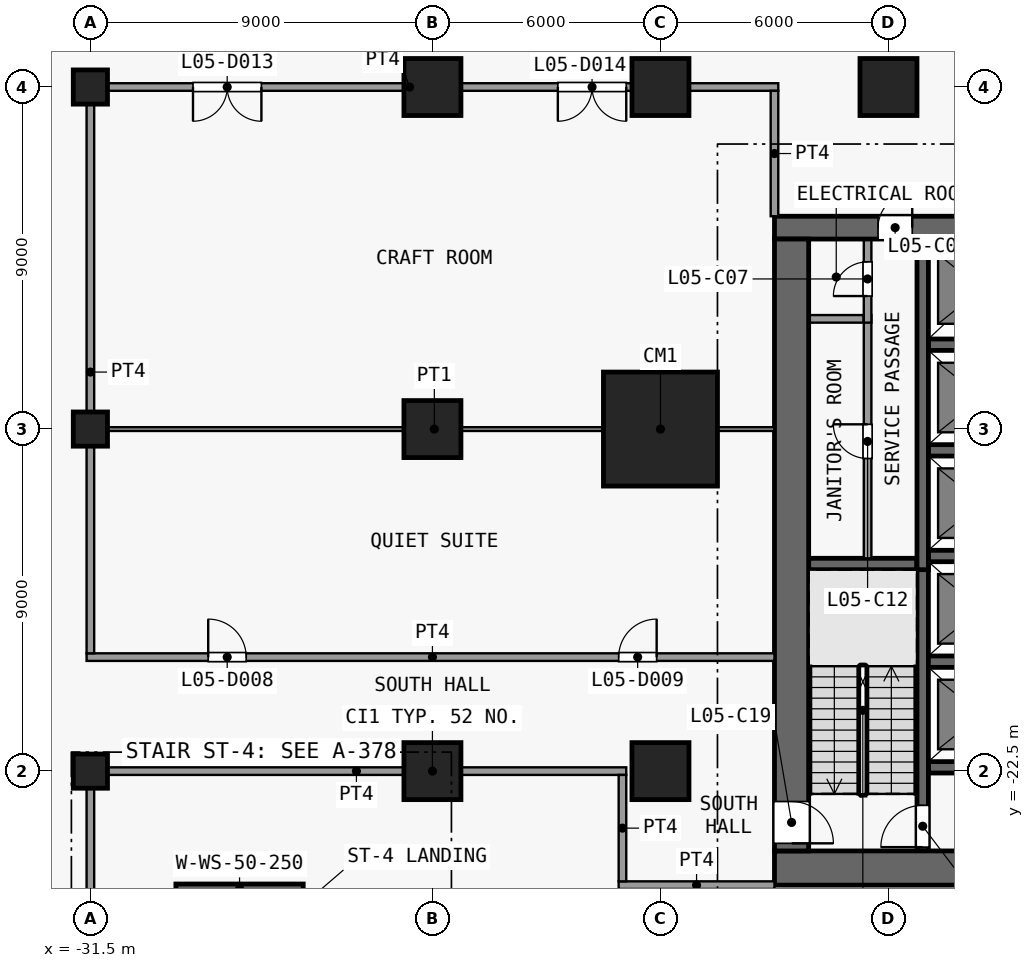
"""IFC4 building model, lengths in metres.
Left out: names, types, materials, properties, quantities, classifications, styles, units other than length and angle.
Written with IfcOpenShell. Run it as: python <this file> out.ifc"""

import sys

from ifc_helpers import new_model, si_unit, direction, frame, frame_2d, origin, origin_2d, place, context, subcontext, project, spatial, rectangle, extrude, element, fill, save


model = new_model("IFC4")
c1 = context("Model", 3, precision=1e-05, world=origin(), true_north=direction((0.0, 1.0)))
c2 = subcontext(c1, "Body", "Model", "MODEL_VIEW")
j1 = project(units=[si_unit("LENGTHUNIT", "METRE"), si_unit("PLANEANGLEUNIT", "RADIAN")], contexts=[c1])
p1 = place(None, origin())
s1 = spatial("IfcSite", under=j1, at=p1, CompositionType="ELEMENT")
p2 = place(p1, origin())
s2 = spatial("IfcBuilding", under=s1, at=p2, CompositionType="ELEMENT")
p3 = place(p2, frame((0.0, 0.0, 28.0)))
s3 = spatial("IfcBuildingStorey", under=s2, at=p3, CompositionType="ELEMENT", Elevation=28.0)
for number, where, z_axis, x_axis in (
    (1, (-31.5, -22.5, 0.0), (0.0, 0.0, 1.0), (1.0, 0.0, 0.0)),
    (2, (-31.5, -13.5, 0.0), (0.0, 0.0, 1.0), (1.0, 0.0, 0.0)),
    (3, (-31.5, -4.5, 0.0), (0.0, 0.0, 1.0), (1.0, 0.0, 0.0)),
):
    element("IfcColumn", number, at=place(p3, frame(where, z_axis=z_axis, x_axis=x_axis)), inside=s3, PredefinedType="COLUMN", context=c2, shape_type="SweptSolid", body=[
        extrude(rectangle(XDim=0.9, YDim=0.9, at=origin_2d()), origin(), (0.0, 0.0, 1.0), 4.5),
    ])
for number, where, z_axis, x_axis in (
    (4, (-22.5, -22.5, 0.0), (0.0, 0.0, 1.0), (1.0, 0.0, 0.0)),
    (5, (-22.5, -13.5, 0.0), (0.0, 0.0, 1.0), (1.0, 0.0, 0.0)),
    (6, (-22.5, -4.5, 0.0), (0.0, 0.0, 1.0), (1.0, 0.0, 0.0)),
    (7, (-16.5, -22.5, 0.0), (0.0, 0.0, 1.0), (1.0, 0.0, 0.0)),
):
    element("IfcColumn", number, at=place(p3, frame(where, z_axis=z_axis, x_axis=x_axis)), inside=s3, PredefinedType="COLUMN", context=c2, shape_type="SweptSolid", body=[
        extrude(rectangle(XDim=1.5, YDim=1.5, at=origin_2d()), origin(), (0.0, 0.0, 1.0), 4.5),
    ])
p4 = place(p3, frame((-16.5, -13.5, 0.0), z_axis=(0.0, 0.0, 1.0), x_axis=(1.0, 0.0, 0.0)))
e8 = element("IfcColumn", 8, at=p4, inside=s3, PredefinedType="COLUMN", context=c2, shape_type="SweptSolid", body=[
    extrude(rectangle(XDim=3.0, YDim=3.0, at=origin_2d()), origin(), (0.0, 0.0, 1.0), 4.5),
])
for number, where, z_axis, x_axis in (
    (9, (-16.5, -4.5, 0.0), (0.0, 0.0, 1.0), (1.0, 0.0, 0.0)),
    (10, (-10.5, -4.5, 0.0), (0.0, 0.0, 1.0), (1.0, 0.0, 0.0)),
):
    element("IfcColumn", number, at=place(p3, frame(where, z_axis=z_axis, x_axis=x_axis)), inside=s3, PredefinedType="COLUMN", context=c2, shape_type="SweptSolid", body=[
        extrude(rectangle(XDim=1.5, YDim=1.5, at=origin_2d()), origin(), (0.0, 0.0, 1.0), 4.5),
    ])
p5 = place(p3, frame((-13.5, -25.05, 0.0), z_axis=(0.0, 0.0, 1.0), x_axis=(1.0, 0.0, 0.0)))
e11 = element("IfcWall", 11, at=p5, inside=s3, PredefinedType="SHEAR", context=c2, shape_type="SweptSolid", body=[
    extrude(rectangle(XDim=27.0, YDim=0.9, at=frame_2d((13.5, 0.0))), origin(), (0.0, 0.0, 1.0), 4.1),
])
p6 = place(p3, frame((-13.5, -8.2, 0.0), z_axis=(0.0, 0.0, 1.0), x_axis=(1.0, 0.0, 0.0)))
e12 = element("IfcWall", 12, at=p6, inside=s3, PredefinedType="SHEAR", context=c2, shape_type="SweptSolid", body=[
    extrude(rectangle(XDim=27.0, YDim=0.6, at=frame_2d((13.5, 0.0))), origin(), (0.0, 0.0, 1.0), 4.1),
])
p7 = place(p6, frame((7.8, 0.0, 0.0)))
e13 = element("IfcOpeningElement", 13, at=p7, cuts=e12, PredefinedType="OPENING", context=c2, shape_type="SweptSolid", body=[
    extrude(rectangle(XDim=1.8, YDim=2.1, at=frame_2d((0.9, 1.05))), frame((0.0, 0.31, 0.0), z_axis=(0.0, -1.0, 0.0), x_axis=(1.0, 0.0, 0.0)), (0.0, 0.0, 1.0), 0.62),
])
p8 = place(p6, frame((17.4, 0.0, 0.0)))
e14 = element("IfcOpeningElement", 14, at=p8, cuts=e12, PredefinedType="OPENING", context=c2, shape_type="SweptSolid", body=[
    extrude(rectangle(XDim=1.8, YDim=2.1, at=frame_2d((0.9, 1.05))), frame((0.0, 0.31, 0.0), z_axis=(0.0, -1.0, 0.0), x_axis=(1.0, 0.0, 0.0)), (0.0, 0.0, 1.0), 0.62),
])
p9 = place(p6, frame((2.725, 0.0, 0.0)))
e15 = element("IfcOpeningElement", 15, at=p9, cuts=e12, PredefinedType="OPENING", context=c2, shape_type="SweptSolid", body=[
    extrude(rectangle(XDim=0.9, YDim=2.1, at=frame_2d((0.45, 1.05))), frame((0.0, 0.31, 0.0), z_axis=(0.0, -1.0, 0.0), x_axis=(1.0, 0.0, 0.0)), (0.0, 0.0, 1.0), 0.62),
])
p10 = place(p6, frame((23.375, 0.0, 0.0)))
e16 = element("IfcOpeningElement", 16, at=p10, cuts=e12, PredefinedType="OPENING", context=c2, shape_type="SweptSolid", body=[
    extrude(rectangle(XDim=0.9, YDim=2.1, at=frame_2d((0.45, 1.05))), frame((0.0, 0.31, 0.0), z_axis=(0.0, -1.0, 0.0), x_axis=(1.0, 0.0, 0.0)), (0.0, 0.0, 1.0), 0.62),
])
p11 = place(p3, frame((-13.05, -8.5, 0.0), z_axis=(0.0, 0.0, 1.0), x_axis=(0.0, -1.0, 0.0)))
e17 = element("IfcWall", 17, at=p11, inside=s3, PredefinedType="SHEAR", context=c2, shape_type="SweptSolid", body=[
    extrude(rectangle(XDim=16.1, YDim=0.9, at=frame_2d((8.05, 0.0))), origin(), (0.0, 0.0, 1.0), 4.1),
])
p12 = place(p11, frame((14.8, 0.0, 0.0)))
e18 = element("IfcOpeningElement", 18, at=p12, cuts=e17, PredefinedType="OPENING", context=c2, shape_type="SweptSolid", body=[
    extrude(rectangle(XDim=1.1, YDim=2.1, at=frame_2d((0.55, 1.05))), frame((0.0, 0.46, 0.0), z_axis=(0.0, -1.0, 0.0), x_axis=(1.0, 0.0, 0.0)), (0.0, 0.0, 1.0), 0.92),
])
for number, where, z_axis, x_axis in (
    (19, (-9.45, -22.4, 0.0), (0.0, 0.0, 1.0), (1.0, 0.0, 0.0)),
    (20, (-9.45, -19.62, 0.0), (0.0, 0.0, 1.0), (1.0, 0.0, 0.0)),
):
    element("IfcWall", number, at=place(p3, frame(where, z_axis=z_axis, x_axis=x_axis)), inside=s3, PredefinedType="SHEAR", context=c2, shape_type="SweptSolid", body=[
        extrude(rectangle(XDim=2.8, YDim=0.3, at=frame_2d((1.4, 0.0))), origin(), (0.0, 0.0, 1.0), 4.1),
    ])
p13 = place(p3, frame((-12.6, -17.05, 0.0), z_axis=(0.0, 0.0, 1.0), x_axis=(1.0, 0.0, 0.0)))
e21 = element("IfcWall", 21, at=p13, inside=s3, PredefinedType="SHEAR", context=c2, shape_type="SweptSolid", body=[
    extrude(rectangle(XDim=2.85, YDim=0.3, at=frame_2d((1.425, 0.0))), origin(), (0.0, 0.0, 1.0), 4.1),
])
for number, where, z_axis, x_axis in (
    (22, (-9.45, -16.84, 0.0), (0.0, 0.0, 1.0), (1.0, 0.0, 0.0)),
    (23, (-9.45, -14.06, 0.0), (0.0, 0.0, 1.0), (1.0, 0.0, 0.0)),
    (24, (-9.45, -11.28, 0.0), (0.0, 0.0, 1.0), (1.0, 0.0, 0.0)),
):
    element("IfcWall", number, at=place(p3, frame(where, z_axis=z_axis, x_axis=x_axis)), inside=s3, PredefinedType="SHEAR", context=c2, shape_type="SweptSolid", body=[
        extrude(rectangle(XDim=2.8, YDim=0.3, at=frame_2d((1.4, 0.0))), origin(), (0.0, 0.0, 1.0), 4.1),
    ])
p14 = place(p3, frame((-12.6, -10.6, 0.0), z_axis=(0.0, 0.0, 1.0), x_axis=(1.0, 0.0, 0.0)))
e25 = element("IfcWall", 25, at=p14, inside=s3, PredefinedType="PARTITIONING", context=c2, shape_type="SweptSolid", body=[
    extrude(rectangle(XDim=1.45, YDim=0.2, at=frame_2d((0.725, 0.0))), origin(), (0.0, 0.0, 1.0), 4.1),
])
p15 = place(p3, frame((-11.05, -16.9, 0.0), z_axis=(0.0, 0.0, 1.0), x_axis=(0.0, 1.0, 0.0)))
e26 = element("IfcWall", 26, at=p15, inside=s3, PredefinedType="PARTITIONING", context=c2, shape_type="SweptSolid", body=[
    extrude(rectangle(XDim=6.4, YDim=0.2, at=frame_2d((3.2, 0.0))), origin(), (0.0, 0.0, 1.0), 4.1),
])
p16 = place(p15, frame((2.625, 0.0, 0.0)))
e27 = element("IfcOpeningElement", 27, at=p16, cuts=e26, PredefinedType="OPENING", context=c2, shape_type="SweptSolid", body=[
    extrude(rectangle(XDim=0.9, YDim=2.1, at=frame_2d((0.45, 1.05))), frame((0.0, 0.11, 0.0), z_axis=(0.0, -1.0, 0.0), x_axis=(1.0, 0.0, 0.0)), (0.0, 0.0, 1.0), 0.22),
])
p17 = place(p3, frame((-11.05, -10.7, 0.0), z_axis=(0.0, 0.0, 1.0), x_axis=(0.0, 1.0, 0.0)))
e28 = element("IfcWall", 28, at=p17, inside=s3, PredefinedType="PARTITIONING", context=c2, shape_type="SweptSolid", body=[
    extrude(rectangle(XDim=2.2, YDim=0.2, at=frame_2d((1.1, 0.0))), origin(), (0.0, 0.0, 1.0), 4.1),
])
p18 = place(p17, frame((0.7, 0.0, 0.0)))
e29 = element("IfcOpeningElement", 29, at=p18, cuts=e28, PredefinedType="OPENING", context=c2, shape_type="SweptSolid", body=[
    extrude(rectangle(XDim=0.9, YDim=2.1, at=frame_2d((0.45, 1.05))), frame((0.0, 0.11, 0.0), z_axis=(0.0, -1.0, 0.0), x_axis=(1.0, 0.0, 0.0)), (0.0, 0.0, 1.0), 0.22),
])
p19 = place(p3, frame((-9.6, -24.6, 0.0), z_axis=(0.0, 0.0, 1.0), x_axis=(0.0, 1.0, 0.0)))
e30 = element("IfcWall", 30, at=p19, inside=s3, PredefinedType="SHEAR", context=c2, shape_type="SweptSolid", body=[
    extrude(rectangle(XDim=7.7, YDim=0.3, at=frame_2d((3.85, 0.0))), origin(), (0.0, 0.0, 1.0), 4.1),
])
p20 = place(p19, frame((0.1, 0.0, 0.0)))
e31 = element("IfcOpeningElement", 31, at=p20, cuts=e30, PredefinedType="OPENING", context=c2, shape_type="SweptSolid", body=[
    extrude(rectangle(XDim=1.1, YDim=2.1, at=frame_2d((0.55, 1.05))), frame((0.0, 0.16, 0.0), z_axis=(0.0, -1.0, 0.0), x_axis=(1.0, 0.0, 0.0)), (0.0, 0.0, 1.0), 0.32),
])
p21 = place(p3, frame((-9.6, -17.2, 0.0), z_axis=(0.0, 0.0, 1.0), x_axis=(0.0, 1.0, 0.0)))
e32 = element("IfcWall", 32, at=p21, inside=s3, PredefinedType="SHEAR", context=c2, shape_type="SweptSolid", body=[
    extrude(rectangle(XDim=8.7, YDim=0.3, at=frame_2d((4.35, 0.0))), origin(), (0.0, 0.0, 1.0), 4.1),
])
p22 = place(p3, frame((-29.25, -25.595, 0.0), z_axis=(0.0, 0.0, 1.0), x_axis=(1.0, 0.0, 0.0)))
e33 = element("IfcWall", 33, at=p22, inside=s3, PredefinedType="SHEAR", context=c2, shape_type="SweptSolid", body=[
    extrude(rectangle(XDim=3.35, YDim=0.25, at=frame_2d((1.675, 0.0))), origin(), (0.0, 0.0, 1.0), 4.1),
])
p23 = place(p3, frame((-17.6, -25.5, 0.0), z_axis=(0.0, 0.0, 1.0), x_axis=(1.0, 0.0, 0.0)))
e34 = element("IfcWall", 34, at=p23, inside=s3, PredefinedType="PARTITIONING", context=c2, shape_type="SweptSolid", body=[
    extrude(rectangle(XDim=4.1, YDim=0.2, at=frame_2d((2.05, 0.0))), origin(), (0.0, 0.0, 1.0), 4.1),
])
p24 = place(p3, frame((-31.6, -22.5, 0.0), z_axis=(0.0, 0.0, 1.0), x_axis=(1.0, 0.0, 0.0)))
e35 = element("IfcWall", 35, at=p24, inside=s3, PredefinedType="PARTITIONING", context=c2, shape_type="SweptSolid", body=[
    extrude(rectangle(XDim=14.2, YDim=0.2, at=frame_2d((7.1, 0.0))), origin(), (0.0, 0.0, 1.0), 4.1),
])
p25 = place(p3, frame((-31.6, -19.5, 0.0), z_axis=(0.0, 0.0, 1.0), x_axis=(1.0, 0.0, 0.0)))
e36 = element("IfcWall", 36, at=p25, inside=s3, PredefinedType="PARTITIONING", context=c2, shape_type="SweptSolid", body=[
    extrude(rectangle(XDim=18.1, YDim=0.2, at=frame_2d((9.05, 0.0))), origin(), (0.0, 0.0, 1.0), 4.1),
])
p26 = place(p25, frame((3.2, 0.0, 0.0)))
e37 = element("IfcOpeningElement", 37, at=p26, cuts=e36, PredefinedType="OPENING", context=c2, shape_type="SweptSolid", body=[
    extrude(rectangle(XDim=1.0, YDim=2.1, at=frame_2d((0.5, 1.05))), frame((0.0, 0.11, 0.0), z_axis=(0.0, -1.0, 0.0), x_axis=(1.0, 0.0, 0.0)), (0.0, 0.0, 1.0), 0.22),
])
p27 = place(p25, frame((14.0, 0.0, 0.0)))
e38 = element("IfcOpeningElement", 38, at=p27, cuts=e36, PredefinedType="OPENING", context=c2, shape_type="SweptSolid", body=[
    extrude(rectangle(XDim=1.0, YDim=2.1, at=frame_2d((0.5, 1.05))), frame((0.0, 0.11, 0.0), z_axis=(0.0, -1.0, 0.0), x_axis=(1.0, 0.0, 0.0)), (0.0, 0.0, 1.0), 0.22),
])
p28 = place(p3, frame((-31.4, -13.5, 0.0), z_axis=(0.0, 0.0, 1.0), x_axis=(1.0, 0.0, 0.0)))
e39 = element("IfcWall", 39, at=p28, inside=s3, PredefinedType="PARTITIONING", context=c2, shape_type="SweptSolid", body=[
    extrude(rectangle(XDim=17.9, YDim=0.1, at=frame_2d((8.95, 0.0))), origin(), (0.0, 0.0, 1.0), 4.1),
])
p29 = place(p3, frame((-31.6, -4.5, 0.0), z_axis=(0.0, 0.0, 1.0), x_axis=(1.0, 0.0, 0.0)))
e40 = element("IfcWall", 40, at=p29, inside=s3, PredefinedType="PARTITIONING", context=c2, shape_type="SweptSolid", body=[
    extrude(rectangle(XDim=18.2, YDim=0.2, at=frame_2d((9.1, 0.0))), origin(), (0.0, 0.0, 1.0), 4.1),
])
p30 = place(p29, frame((2.8, 0.0, 0.0)))
e41 = element("IfcOpeningElement", 41, at=p30, cuts=e40, PredefinedType="OPENING", context=c2, shape_type="SweptSolid", body=[
    extrude(rectangle(XDim=1.8, YDim=2.1, at=frame_2d((0.9, 1.05))), frame((0.0, 0.11, 0.0), z_axis=(0.0, -1.0, 0.0), x_axis=(1.0, 0.0, 0.0)), (0.0, 0.0, 1.0), 0.22),
])
p31 = place(p29, frame((12.4, 0.0, 0.0)))
e42 = element("IfcOpeningElement", 42, at=p31, cuts=e40, PredefinedType="OPENING", context=c2, shape_type="SweptSolid", body=[
    extrude(rectangle(XDim=1.8, YDim=2.1, at=frame_2d((0.9, 1.05))), frame((0.0, 0.11, 0.0), z_axis=(0.0, -1.0, 0.0), x_axis=(1.0, 0.0, 0.0)), (0.0, 0.0, 1.0), 0.22),
])
p32 = place(p3, frame((-31.5, -31.4, 0.0), z_axis=(0.0, 0.0, 1.0), x_axis=(0.0, 1.0, 0.0)))
e43 = element("IfcWall", 43, at=p32, inside=s3, PredefinedType="PARTITIONING", context=c2, shape_type="SweptSolid", body=[
    extrude(rectangle(XDim=8.8, YDim=0.2, at=frame_2d((4.4, 0.0))), origin(), (0.0, 0.0, 1.0), 4.1),
])
p33 = place(p3, frame((-31.5, -19.4, 0.0), z_axis=(0.0, 0.0, 1.0), x_axis=(0.0, 1.0, 0.0)))
e44 = element("IfcWall", 44, at=p33, inside=s3, PredefinedType="PARTITIONING", context=c2, shape_type="SweptSolid", body=[
    extrude(rectangle(XDim=14.8, YDim=0.2, at=frame_2d((7.4, 0.0))), origin(), (0.0, 0.0, 1.0), 4.1),
])
p34 = place(p3, frame((-17.5, -25.4, 0.0), z_axis=(0.0, 0.0, 1.0), x_axis=(0.0, 1.0, 0.0)))
e45 = element("IfcWall", 45, at=p34, inside=s3, PredefinedType="PARTITIONING", context=c2, shape_type="SweptSolid", body=[
    extrude(rectangle(XDim=2.8, YDim=0.2, at=frame_2d((1.4, 0.0))), origin(), (0.0, 0.0, 1.0), 4.1),
])
p35 = place(p3, frame((-13.5, -7.9, 0.0), z_axis=(0.0, 0.0, 1.0), x_axis=(0.0, 1.0, 0.0)))
e46 = element("IfcWall", 46, at=p35, inside=s3, PredefinedType="PARTITIONING", context=c2, shape_type="SweptSolid", body=[
    extrude(rectangle(XDim=3.3, YDim=0.2, at=frame_2d((1.65, 0.0))), origin(), (0.0, 0.0, 1.0), 4.1),
])
p36 = place(p18, origin())
e47 = element("IfcDoor", 47, at=p36, inside=s3, OperationType="SINGLE_SWING_LEFT", PredefinedType="DOOR", context=c2, shape_type="SweptSolid", body=[
    extrude(rectangle(XDim=0.9, YDim=2.1, at=frame_2d((0.45, 1.05))), frame((0.0, 0.025, 0.0), z_axis=(0.0, -1.0, 0.0), x_axis=(1.0, 0.0, 0.0)), (0.0, 0.0, 1.0), 0.05),
])
fill(e29, e47)
p37 = place(p9, origin())
e48 = element("IfcDoor", 48, at=p37, inside=s3, OperationType="SINGLE_SWING_RIGHT", PredefinedType="DOOR", context=c2, shape_type="SweptSolid", body=[
    extrude(rectangle(XDim=0.9, YDim=2.1, at=frame_2d((0.45, 1.05))), frame((0.0, 0.025, 0.0), z_axis=(0.0, -1.0, 0.0), x_axis=(1.0, 0.0, 0.0)), (0.0, 0.0, 1.0), 0.05),
])
fill(e15, e48)
p38 = place(p16, origin())
e49 = element("IfcDoor", 49, at=p38, inside=s3, OperationType="SINGLE_SWING_RIGHT", PredefinedType="DOOR", context=c2, shape_type="SweptSolid", body=[
    extrude(rectangle(XDim=0.9, YDim=2.1, at=frame_2d((0.45, 1.05))), frame((0.0, 0.025, 0.0), z_axis=(0.0, -1.0, 0.0), x_axis=(1.0, 0.0, 0.0)), (0.0, 0.0, 1.0), 0.05),
])
fill(e27, e49)
p39 = place(p20, origin())
e50 = element("IfcDoor", 50, at=p39, inside=s3, OperationType="SINGLE_SWING_LEFT", PredefinedType="DOOR", context=c2, shape_type="SweptSolid", body=[
    extrude(rectangle(XDim=1.1, YDim=2.1, at=frame_2d((0.55, 1.05))), frame((0.0, 0.025, 0.0), z_axis=(0.0, -1.0, 0.0), x_axis=(1.0, 0.0, 0.0)), (0.0, 0.0, 1.0), 0.05),
])
fill(e31, e50)
p40 = place(p12, origin())
e51 = element("IfcDoor", 51, at=p40, inside=s3, OperationType="SINGLE_SWING_RIGHT", PredefinedType="DOOR", context=c2, shape_type="SweptSolid", body=[
    extrude(rectangle(XDim=1.1, YDim=2.1, at=frame_2d((0.55, 1.05))), frame((0.0, 0.025, 0.0), z_axis=(0.0, -1.0, 0.0), x_axis=(1.0, 0.0, 0.0)), (0.0, 0.0, 1.0), 0.05),
])
fill(e18, e51)
p41 = place(p26, origin())
e52 = element("IfcDoor", 52, at=p41, inside=s3, OperationType="SINGLE_SWING_RIGHT", PredefinedType="DOOR", context=c2, shape_type="SweptSolid", body=[
    extrude(rectangle(XDim=1.0, YDim=2.1, at=frame_2d((0.5, 1.05))), frame((0.0, 0.025, 0.0), z_axis=(0.0, -1.0, 0.0), x_axis=(1.0, 0.0, 0.0)), (0.0, 0.0, 1.0), 0.05),
])
fill(e37, e52)
p42 = place(p27, origin())
e53 = element("IfcDoor", 53, at=p42, inside=s3, OperationType="SINGLE_SWING_LEFT", PredefinedType="DOOR", context=c2, shape_type="SweptSolid", body=[
    extrude(rectangle(XDim=1.0, YDim=2.1, at=frame_2d((0.5, 1.05))), frame((0.0, 0.025, 0.0), z_axis=(0.0, -1.0, 0.0), x_axis=(1.0, 0.0, 0.0)), (0.0, 0.0, 1.0), 0.05),
])
fill(e38, e53)
p43 = place(p30, origin())
e54 = element("IfcDoor", 54, at=p43, inside=s3, OperationType="DOUBLE_DOOR_SINGLE_SWING", PredefinedType="DOOR", context=c2, shape_type="SweptSolid", body=[
    extrude(rectangle(XDim=1.8, YDim=2.1, at=frame_2d((0.9, 1.05))), frame((0.0, 0.025, 0.0), z_axis=(0.0, -1.0, 0.0), x_axis=(1.0, 0.0, 0.0)), (0.0, 0.0, 1.0), 0.05),
])
fill(e41, e54)
p44 = place(p31, origin())
e55 = element("IfcDoor", 55, at=p44, inside=s3, OperationType="DOUBLE_DOOR_SINGLE_SWING", PredefinedType="DOOR", context=c2, shape_type="SweptSolid", body=[
    extrude(rectangle(XDim=1.8, YDim=2.1, at=frame_2d((0.9, 1.05))), frame((0.0, 0.025, 0.0), z_axis=(0.0, -1.0, 0.0), x_axis=(1.0, 0.0, 0.0)), (0.0, 0.0, 1.0), 0.05),
])
fill(e42, e55)
save(model, sys.argv[1])
